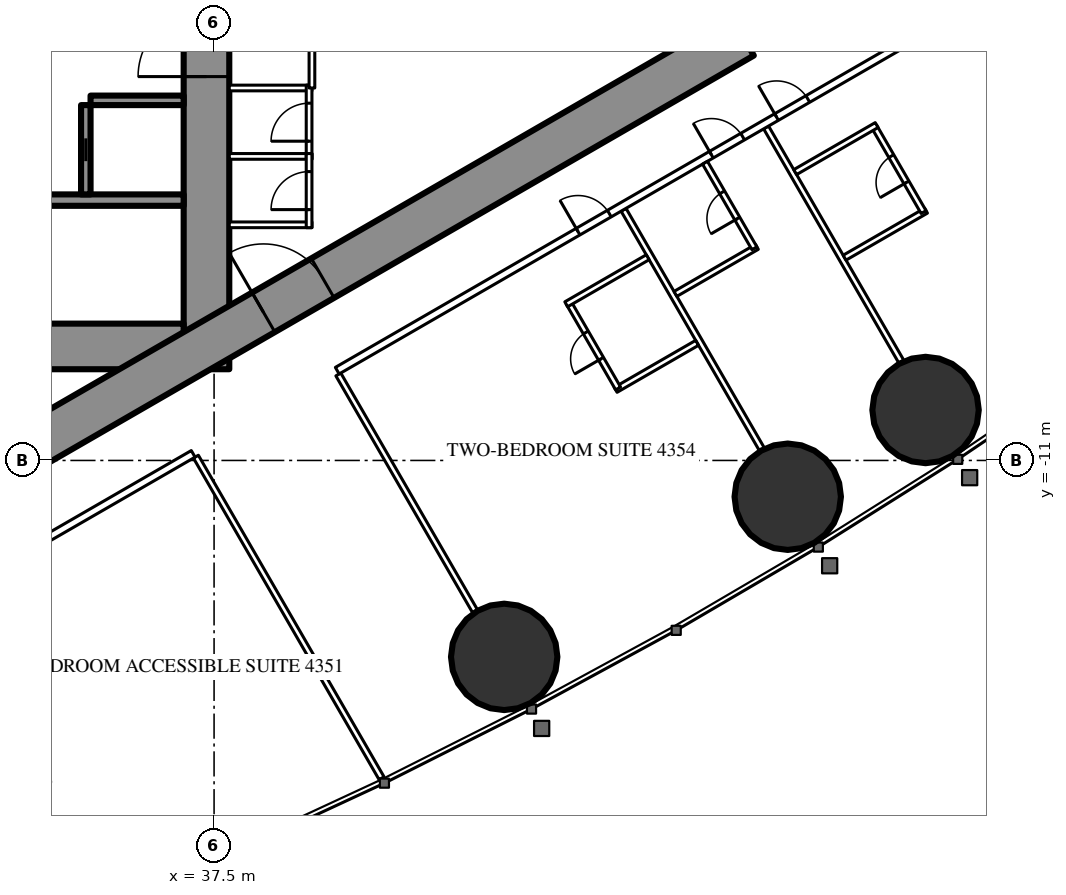
"""IFC4 building model, lengths in metres.
Left out: names, types, materials, properties, quantities, classifications, styles, units other than length and angle.
Written with IfcOpenShell. Run it as: python <this file> out.ifc"""

import sys

from ifc_helpers import new_model, si_unit, direction, frame, frame_2d, origin, origin_2d, place, context, subcontext, project, spatial, rectangle, circle, extrude, element, fill, save


model = new_model("IFC4")
c1 = context("Model", 3, precision=1e-05, world=origin(), true_north=direction((0.0, 1.0)))
c2 = subcontext(c1, "Body", "Model", "MODEL_VIEW")
j1 = project(units=[si_unit("LENGTHUNIT", "METRE"), si_unit("PLANEANGLEUNIT", "RADIAN")], contexts=[c1])
p1 = place(None, origin())
s1 = spatial("IfcSite", under=j1, at=p1, CompositionType="ELEMENT")
p2 = place(p1, origin())
s2 = spatial("IfcBuilding", under=s1, at=p2, CompositionType="ELEMENT")
p3 = place(p2, frame((0.0, 0.0, 163.3)))
s3 = spatial("IfcBuildingStorey", under=s2, at=p3, CompositionType="ELEMENT", Elevation=163.3)
for number, where, z_axis, x_axis in (
    (1, (45.134, -16.168, 0.0), (0.0, 0.0, 1.0), (1.0, 0.0, 0.0)),
    (2, (52.594, -11.955, 0.0), (0.0, 0.0, 1.0), (1.0, 0.0, 0.0)),
    (3, (56.221, -9.672, 0.0), (0.0, 0.0, 1.0), (1.0, 0.0, 0.0)),
):
    element("IfcColumn", number, at=place(p3, frame(where, z_axis=z_axis, x_axis=x_axis)), inside=s3, PredefinedType="COLUMN", context=c2, shape_type="SweptSolid", body=[
        extrude(circle(Radius=1.4, at=origin_2d()), origin(), (0.0, 0.0, 1.0), 3.5),
    ])
p4 = place(p3, frame((37.3, -8.6, 0.0), z_axis=(0.0, 0.0, 1.0), x_axis=(0.0, 1.0, 0.0)))
e4 = element("IfcWall", 4, at=p4, inside=s3, PredefinedType="SHEAR", context=c2, shape_type="SweptSolid", body=[
    extrude(rectangle(XDim=17.2, YDim=1.2, at=frame_2d((8.6, 0.0))), origin(), (0.0, 0.0, 1.0), 3.5),
])
p5 = place(p4, frame((7.7, 0.0, 0.0)))
e5 = element("IfcOpeningElement", 5, at=p5, cuts=e4, PredefinedType="OPENING", context=c2, shape_type="SweptSolid", body=[
    extrude(rectangle(XDim=1.8, YDim=2.2, at=frame_2d((0.9, 1.1))), frame((0.0, 0.61, 0.0), z_axis=(0.0, -1.0, 0.0), x_axis=(1.0, 0.0, 0.0)), (0.0, 0.0, 1.0), 1.22),
])
p6 = place(p3, frame((28.3, -8.0, 0.0), z_axis=(0.0, 0.0, 1.0), x_axis=(1.0, 0.0, 0.0)))
e6 = element("IfcWall", 6, at=p6, inside=s3, PredefinedType="SHEAR", context=c2, shape_type="SweptSolid", body=[
    extrude(rectangle(XDim=8.4, YDim=1.2, at=frame_2d((4.2, 0.0))), origin(), (0.0, 0.0, 1.0), 3.5),
])
p7 = place(p6, frame((0.25, 0.0, 0.0)))
e7 = element("IfcOpeningElement", 7, at=p7, cuts=e6, PredefinedType="OPENING", context=c2, shape_type="SweptSolid", body=[
    extrude(rectangle(XDim=1.0, YDim=2.2, at=frame_2d((0.5, 1.1))), frame((0.0, 0.61, 0.0), z_axis=(0.0, -1.0, 0.0), x_axis=(1.0, 0.0, 0.0)), (0.0, 0.0, 1.0), 1.22),
])
p8 = place(p3, frame((28.3, -4.15, 0.0), z_axis=(0.0, 0.0, 1.0), x_axis=(1.0, 0.0, 0.0)))
e8 = element("IfcWall", 8, at=p8, inside=s3, PredefinedType="SHEAR", context=c2, shape_type="SweptSolid", body=[
    extrude(rectangle(XDim=8.4, YDim=0.3, at=frame_2d((4.2, 0.0))), origin(), (0.0, 0.0, 1.0), 3.5),
])
p9 = place(p3, frame((34.125, -4.0, 0.0), z_axis=(0.0, 0.0, 1.0), x_axis=(0.0, 1.0, 0.0)))
e9 = element("IfcWall", 9, at=p9, inside=s3, PredefinedType="SHEAR", context=c2, shape_type="SweptSolid", body=[
    extrude(rectangle(XDim=2.35, YDim=0.25, at=frame_2d((1.175, 0.0))), origin(), (0.0, 0.0, 1.0), 3.5),
])
p10 = place(p9, frame((0.875, 0.0, 0.0)))
e10 = element("IfcOpeningElement", 10, at=p10, cuts=e9, PredefinedType="OPENING", context=c2, shape_type="SweptSolid", body=[
    extrude(rectangle(XDim=0.6, YDim=2.0, at=frame_2d((0.3, 1.0))), frame((0.0, 0.135, 0.0), z_axis=(0.0, -1.0, 0.0), x_axis=(1.0, 0.0, 0.0)), (0.0, 0.0, 1.0), 0.27),
])
p11 = place(p3, frame((34.25, -1.525, 0.0), z_axis=(0.0, 0.0, 1.0), x_axis=(1.0, 0.0, 0.0)))
e11 = element("IfcWall", 11, at=p11, inside=s3, PredefinedType="SHEAR", context=c2, shape_type="SweptSolid", body=[
    extrude(rectangle(XDim=2.45, YDim=0.25, at=frame_2d((1.225, 0.0))), origin(), (0.0, 0.0, 1.0), 3.5),
])
p12 = place(p3, frame((27.2, -13.8, 0.0), z_axis=(0.0, 0.0, 1.0), x_axis=(0.866027159892, 0.499996958321, 0.0)))
e12 = element("IfcWall", 12, at=p12, inside=s3, PredefinedType="SHEAR", context=c2, shape_type="SweptSolid", body=[
    extrude(rectangle(XDim=27.947, YDim=1.2, at=frame_2d((13.973, 0.0))), origin(), (0.0, 0.0, 1.0), 3.5),
])
p13 = place(p12, frame((4.6, 0.0, 0.0)))
e13 = element("IfcOpeningElement", 13, at=p13, cuts=e12, PredefinedType="OPENING", context=c2, shape_type="SweptSolid", body=[
    extrude(rectangle(XDim=1.0, YDim=2.2, at=frame_2d((0.5, 1.1))), frame((0.0, 0.61, 0.0), z_axis=(0.0, -1.0, 0.0), x_axis=(1.0, 0.0, 0.0)), (0.0, 0.0, 1.0), 1.22),
])
p14 = place(p12, frame((13.395, 0.0, 0.0)))
e14 = element("IfcOpeningElement", 14, at=p14, cuts=e12, PredefinedType="OPENING", context=c2, shape_type="SweptSolid", body=[
    extrude(rectangle(XDim=1.8, YDim=2.2, at=frame_2d((0.9, 1.1))), frame((0.0, 0.61, 0.0), z_axis=(0.0, -1.0, 0.0), x_axis=(1.0, 0.0, 0.0)), (0.0, 0.0, 1.0), 1.22),
])
p15 = place(p3, frame((37.022, -10.9, 0.0), z_axis=(0.0, 0.0, 1.0), x_axis=(0.499998620953, -0.866026199976, 0.0)))
e15 = element("IfcWall", 15, at=p15, inside=s3, PredefinedType="PARTITIONING", context=c2, shape_type="SweptSolid", body=[
    extrude(rectangle(XDim=9.77, YDim=0.15, at=frame_2d((4.885, 0.0))), origin(), (0.0, 0.0, 1.0), 3.25),
])
p16 = place(p3, frame((40.769, -8.737, 0.0), z_axis=(0.0, 0.0, 1.0), x_axis=(0.500013115284, -0.866017831539, 0.0)))
e16 = element("IfcWall", 16, at=p16, inside=s3, PredefinedType="PARTITIONING", context=c2, shape_type="SweptSolid", body=[
    extrude(rectangle(XDim=7.198, YDim=0.15, at=frame_2d((3.599, 0.0))), origin(), (0.0, 0.0, 1.0), 2.3),
])
p17 = place(p3, frame((48.275, -4.404, 0.0), z_axis=(0.0, 0.0, 1.0), x_axis=(0.500006004368, -0.866021937133, 0.0)))
e17 = element("IfcWall", 17, at=p17, inside=s3, PredefinedType="PARTITIONING", context=c2, shape_type="SweptSolid", body=[
    extrude(rectangle(XDim=7.279, YDim=0.15, at=frame_2d((3.64, 0.0))), origin(), (0.0, 0.0, 1.0), 2.3),
])
p18 = place(p3, frame((52.025, -2.238, 0.0), z_axis=(0.0, 0.0, 1.0), x_axis=(0.499983785035, -0.866034765296, 0.0)))
e18 = element("IfcWall", 18, at=p18, inside=s3, PredefinedType="PARTITIONING", context=c2, shape_type="SweptSolid", body=[
    extrude(rectangle(XDim=7.116, YDim=0.15, at=frame_2d((3.558, 0.0))), origin(), (0.0, 0.0, 1.0), 2.3),
])
p19 = place(p3, frame((27.959, -16.017, 0.0), z_axis=(0.0, 0.0, 1.0), x_axis=(0.866026201739, 0.499998617899, 0.0)))
e19 = element("IfcWall", 19, at=p19, inside=s3, PredefinedType="PARTITIONING", context=c2, shape_type="SweptSolid", body=[
    extrude(rectangle(XDim=10.382, YDim=0.2, at=frame_2d((5.191, 0.0))), origin(), (0.0, 0.0, 1.0), 3.25),
])
p20 = place(p19, frame((3.35, 0.0, 0.0)))
e20 = element("IfcOpeningElement", 20, at=p20, cuts=e19, PredefinedType="OPENING", context=c2, shape_type="SweptSolid", body=[
    extrude(rectangle(XDim=1.0, YDim=2.2, at=frame_2d((0.5, 1.1))), frame((0.0, 0.11, 0.0), z_axis=(0.0, -1.0, 0.0), x_axis=(1.0, 0.0, 0.0)), (0.0, 0.0, 1.0), 0.22),
])
p21 = place(p3, frame((40.741, -8.638, 0.0), z_axis=(0.0, 0.0, 1.0), x_axis=(0.866022967338, 0.500004220025, 0.0)))
e21 = element("IfcWall", 21, at=p21, inside=s3, PredefinedType="PARTITIONING", context=c2, shape_type="SweptSolid", body=[
    extrude(rectangle(XDim=17.276, YDim=0.2, at=frame_2d((8.638, 0.0))), origin(), (0.0, 0.0, 1.0), 3.25),
])
p22 = place(p21, frame((7.316, 0.0, 0.0)))
e22 = element("IfcOpeningElement", 22, at=p22, cuts=e21, PredefinedType="OPENING", context=c2, shape_type="SweptSolid", body=[
    extrude(rectangle(XDim=0.95, YDim=2.2, at=frame_2d((0.475, 1.1))), frame((0.0, 0.11, 0.0), z_axis=(0.0, -1.0, 0.0), x_axis=(1.0, 0.0, 0.0)), (0.0, 0.0, 1.0), 0.22),
])
p23 = place(p21, frame((11.366, 0.0, 0.0)))
e23 = element("IfcOpeningElement", 23, at=p23, cuts=e21, PredefinedType="OPENING", context=c2, shape_type="SweptSolid", body=[
    extrude(rectangle(XDim=0.95, YDim=2.2, at=frame_2d((0.475, 1.1))), frame((0.0, 0.11, 0.0), z_axis=(0.0, -1.0, 0.0), x_axis=(1.0, 0.0, 0.0)), (0.0, 0.0, 1.0), 0.22),
])
p24 = place(p21, frame((13.347, 0.0, 0.0)))
e24 = element("IfcOpeningElement", 24, at=p24, cuts=e21, PredefinedType="OPENING", context=c2, shape_type="SweptSolid", body=[
    extrude(rectangle(XDim=0.95, YDim=2.2, at=frame_2d((0.475, 1.1))), frame((0.0, 0.11, 0.0), z_axis=(0.0, -1.0, 0.0), x_axis=(1.0, 0.0, 0.0)), (0.0, 0.0, 1.0), 0.22),
])
p25 = place(p3, frame((48.066, -9.143, 0.0), z_axis=(0.0, 0.0, 1.0), x_axis=(0.866006523861, 0.500032699561, 0.0)))
e25 = element("IfcWall", 25, at=p25, inside=s3, PredefinedType="PARTITIONING", context=c2, shape_type="SweptSolid", body=[
    extrude(rectangle(XDim=2.475, YDim=0.15, at=frame_2d((1.237, 0.0))), origin(), (0.0, 0.0, 1.0), 3.25),
])
p26 = place(p3, frame((46.831, -6.854, 0.0), z_axis=(0.0, 0.0, 1.0), x_axis=(0.500006934395, -0.866021400173, 0.0)))
e26 = element("IfcWall", 26, at=p26, inside=s3, PredefinedType="PARTITIONING", context=c2, shape_type="SweptSolid", body=[
    extrude(rectangle(XDim=2.6, YDim=0.15, at=frame_2d((1.3, 0.0))), origin(), (0.0, 0.0, 1.0), 3.25),
])
p27 = place(p26, frame((0.9, 0.0, 0.0)))
e27 = element("IfcOpeningElement", 27, at=p27, cuts=e26, PredefinedType="OPENING", context=c2, shape_type="SweptSolid", body=[
    extrude(rectangle(XDim=0.8, YDim=2.2, at=frame_2d((0.4, 1.1))), frame((0.0, 0.085, 0.0), z_axis=(0.0, -1.0, 0.0), x_axis=(1.0, 0.0, 0.0)), (0.0, 0.0, 1.0), 0.17),
])
for number, where, z_axis, x_axis in (
    (28, (46.766, -6.891, 0.0), (0.0, 0.0, 1.0), (0.866, 0.5, 0.0)),
    (29, (49.64, -6.618, 0.0), (0.0, 0.0, 1.0), (0.866, 0.5, 0.0)),
):
    element("IfcWall", number, at=place(p3, frame(where, z_axis=z_axis, x_axis=x_axis)), inside=s3, PredefinedType="PARTITIONING", context=c2, shape_type="SweptSolid", body=[
        extrude(rectangle(XDim=2.475, YDim=0.15, at=frame_2d((1.237, 0.0))), origin(), (0.0, 0.0, 1.0), 3.25),
    ])
p28 = place(p3, frame((50.418, -3.166, 0.0), z_axis=(0.0, 0.0, 1.0), x_axis=(0.499936506574, -0.866062058628, 0.0)))
e30 = element("IfcWall", 30, at=p28, inside=s3, PredefinedType="PARTITIONING", context=c2, shape_type="SweptSolid", body=[
    extrude(rectangle(XDim=2.6, YDim=0.15, at=frame_2d((1.3, 0.0))), origin(), (0.0, 0.0, 1.0), 3.25),
])
p29 = place(p28, frame((0.9, 0.0, 0.0)))
e31 = element("IfcOpeningElement", 31, at=p29, cuts=e30, PredefinedType="OPENING", context=c2, shape_type="SweptSolid", body=[
    extrude(rectangle(XDim=0.8, YDim=2.2, at=frame_2d((0.4, 1.1))), frame((0.0, 0.085, 0.0), z_axis=(0.0, -1.0, 0.0), x_axis=(1.0, 0.0, 0.0)), (0.0, 0.0, 1.0), 0.17),
])
p30 = place(p3, frame((54.09, -5.665, 0.0), z_axis=(0.0, 0.0, 1.0), x_axis=(0.866006523861, 0.500032699561, 0.0)))
e32 = element("IfcWall", 32, at=p30, inside=s3, PredefinedType="PARTITIONING", context=c2, shape_type="SweptSolid", body=[
    extrude(rectangle(XDim=2.475, YDim=0.15, at=frame_2d((1.237, 0.0))), origin(), (0.0, 0.0, 1.0), 3.25),
])
p31 = place(p3, frame((54.869, -2.213, 0.0), z_axis=(0.0, 0.0, 1.0), x_axis=(0.500047596559, -0.865997922154, 0.0)))
e33 = element("IfcWall", 33, at=p31, inside=s3, PredefinedType="PARTITIONING", context=c2, shape_type="SweptSolid", body=[
    extrude(rectangle(XDim=2.6, YDim=0.15, at=frame_2d((1.3, 0.0))), origin(), (0.0, 0.0, 1.0), 3.25),
])
p32 = place(p31, frame((0.9, 0.0, 0.0)))
e34 = element("IfcOpeningElement", 34, at=p32, cuts=e33, PredefinedType="OPENING", context=c2, shape_type="SweptSolid", body=[
    extrude(rectangle(XDim=0.8, YDim=2.2, at=frame_2d((0.4, 1.1))), frame((0.0, 0.085, 0.0), z_axis=(0.0, -1.0, 0.0), x_axis=(1.0, 0.0, 0.0)), (0.0, 0.0, 1.0), 0.17),
])
p33 = place(p3, frame((52.79, -3.413, 0.0), z_axis=(0.0, 0.0, 1.0), x_axis=(0.866006523861, 0.500032699561, 0.0)))
e35 = element("IfcWall", 35, at=p33, inside=s3, PredefinedType="PARTITIONING", context=c2, shape_type="SweptSolid", body=[
    extrude(rectangle(XDim=2.475, YDim=0.15, at=frame_2d((1.237, 0.0))), origin(), (0.0, 0.0, 1.0), 3.25),
])
for number, where, z_axis, x_axis in (
    (36, (37.9, -1.2, 0.0), (0.0, 0.0, 1.0), (1.0, 0.0, 0.0)),
    (37, (37.9, -3.0, 0.0), (0.0, 0.0, 1.0), (1.0, 0.0, 0.0)),
    (38, (37.9, -4.8, 0.0), (0.0, 0.0, 1.0), (1.0, 0.0, 0.0)),
):
    element("IfcWall", number, at=place(p3, frame(where, z_axis=z_axis, x_axis=x_axis)), inside=s3, PredefinedType="PARTITIONING", context=c2, shape_type="SweptSolid", body=[
        extrude(rectangle(XDim=2.175, YDim=0.15, at=frame_2d((1.087, 0.0))), origin(), (0.0, 0.0, 1.0), 3.25),
    ])
p34 = place(p3, frame((40.0, -3.075, 0.0), z_axis=(0.0, 0.0, 1.0), x_axis=(0.0, 1.0, 0.0)))
e39 = element("IfcWall", 39, at=p34, inside=s3, PredefinedType="PARTITIONING", context=c2, shape_type="SweptSolid", body=[
    extrude(rectangle(XDim=1.95, YDim=0.15, at=frame_2d((0.975, 0.0))), origin(), (0.0, 0.0, 1.0), 3.25),
])
p35 = place(p34, frame((0.475, 0.0, 0.0)))
e40 = element("IfcOpeningElement", 40, at=p35, cuts=e39, PredefinedType="OPENING", context=c2, shape_type="SweptSolid", body=[
    extrude(rectangle(XDim=1.0, YDim=2.2, at=frame_2d((0.5, 1.1))), frame((0.0, 0.085, 0.0), z_axis=(0.0, -1.0, 0.0), x_axis=(1.0, 0.0, 0.0)), (0.0, 0.0, 1.0), 0.17),
])
p36 = place(p3, frame((40.0, -4.875, 0.0), z_axis=(0.0, 0.0, 1.0), x_axis=(0.0, 1.0, 0.0)))
e41 = element("IfcWall", 41, at=p36, inside=s3, PredefinedType="PARTITIONING", context=c2, shape_type="SweptSolid", body=[
    extrude(rectangle(XDim=1.95, YDim=0.15, at=frame_2d((0.975, 0.0))), origin(), (0.0, 0.0, 1.0), 3.25),
])
p37 = place(p36, frame((0.475, 0.0, 0.0)))
e42 = element("IfcOpeningElement", 42, at=p37, cuts=e41, PredefinedType="OPENING", context=c2, shape_type="SweptSolid", body=[
    extrude(rectangle(XDim=1.0, YDim=2.2, at=frame_2d((0.5, 1.1))), frame((0.0, 0.085, 0.0), z_axis=(0.0, -1.0, 0.0), x_axis=(1.0, 0.0, 0.0)), (0.0, 0.0, 1.0), 0.17),
])
p38 = place(p3, frame((40.075, -1.2, 0.0), z_axis=(0.0, 0.0, 1.0), x_axis=(0.0, 1.0, 0.0)))
e43 = element("IfcWall", 43, at=p38, inside=s3, PredefinedType="PARTITIONING", context=c2, shape_type="SweptSolid", body=[
    extrude(rectangle(XDim=6.874, YDim=0.15, at=frame_2d((3.437, 0.0))), origin(), (0.0, 0.0, 1.0), 3.25),
])
p39 = place(p38, frame((2.537, 0.0, 0.0)))
e44 = element("IfcOpeningElement", 44, at=p39, cuts=e43, PredefinedType="OPENING", context=c2, shape_type="SweptSolid", body=[
    extrude(rectangle(XDim=1.8, YDim=2.2, at=frame_2d((0.9, 1.1))), frame((0.0, 0.085, 0.0), z_axis=(0.0, -1.0, 0.0), x_axis=(1.0, 0.0, 0.0)), (0.0, 0.0, 1.0), 0.17),
])
p40 = place(p27, origin())
e45 = element("IfcDoor", 45, at=p40, inside=s3, OperationType="SINGLE_SWING_RIGHT", PredefinedType="DOOR", context=c2, shape_type="SweptSolid", body=[
    extrude(rectangle(XDim=0.8, YDim=2.2, at=frame_2d((0.4, 1.1))), frame((0.0, 0.025, 0.0), z_axis=(0.0, -1.0, 0.0), x_axis=(1.0, 0.0, 0.0)), (0.0, 0.0, 1.0), 0.05),
])
fill(e27, e45)
p41 = place(p22, origin())
e46 = element("IfcDoor", 46, at=p41, inside=s3, OperationType="SINGLE_SWING_LEFT", PredefinedType="DOOR", context=c2, shape_type="SweptSolid", body=[
    extrude(rectangle(XDim=0.95, YDim=2.2, at=frame_2d((0.475, 1.1))), frame((0.0, 0.025, 0.0), z_axis=(0.0, -1.0, 0.0), x_axis=(1.0, 0.0, 0.0)), (0.0, 0.0, 1.0), 0.05),
])
fill(e22, e46)
p42 = place(p29, origin())
e47 = element("IfcDoor", 47, at=p42, inside=s3, OperationType="SINGLE_SWING_RIGHT", PredefinedType="DOOR", context=c2, shape_type="SweptSolid", body=[
    extrude(rectangle(XDim=0.8, YDim=2.2, at=frame_2d((0.4, 1.1))), frame((0.0, 0.025, 0.0), z_axis=(0.0, -1.0, 0.0), x_axis=(1.0, 0.0, 0.0)), (0.0, 0.0, 1.0), 0.05),
])
fill(e31, e47)
p43 = place(p23, origin())
e48 = element("IfcDoor", 48, at=p43, inside=s3, OperationType="SINGLE_SWING_LEFT", PredefinedType="DOOR", context=c2, shape_type="SweptSolid", body=[
    extrude(rectangle(XDim=0.95, YDim=2.2, at=frame_2d((0.475, 1.1))), frame((0.0, 0.025, 0.0), z_axis=(0.0, -1.0, 0.0), x_axis=(1.0, 0.0, 0.0)), (0.0, 0.0, 1.0), 0.05),
])
fill(e23, e48)
p44 = place(p32, origin())
e49 = element("IfcDoor", 49, at=p44, inside=s3, OperationType="SINGLE_SWING_RIGHT", PredefinedType="DOOR", context=c2, shape_type="SweptSolid", body=[
    extrude(rectangle(XDim=0.8, YDim=2.2, at=frame_2d((0.4, 1.1))), frame((0.0, 0.025, 0.0), z_axis=(0.0, -1.0, 0.0), x_axis=(1.0, 0.0, 0.0)), (0.0, 0.0, 1.0), 0.05),
])
fill(e34, e49)
p45 = place(p24, origin())
e50 = element("IfcDoor", 50, at=p45, inside=s3, OperationType="SINGLE_SWING_LEFT", PredefinedType="DOOR", context=c2, shape_type="SweptSolid", body=[
    extrude(rectangle(XDim=0.95, YDim=2.2, at=frame_2d((0.475, 1.1))), frame((0.0, 0.025, 0.0), z_axis=(0.0, -1.0, 0.0), x_axis=(1.0, 0.0, 0.0)), (0.0, 0.0, 1.0), 0.05),
])
fill(e24, e50)
p46 = place(p35, origin())
e51 = element("IfcDoor", 51, at=p46, inside=s3, OperationType="SINGLE_SWING_LEFT", PredefinedType="DOOR", context=c2, shape_type="SweptSolid", body=[
    extrude(rectangle(XDim=1.0, YDim=2.2, at=frame_2d((0.5, 1.1))), frame((0.0, 0.025, 0.0), z_axis=(0.0, -1.0, 0.0), x_axis=(1.0, 0.0, 0.0)), (0.0, 0.0, 1.0), 0.05),
])
fill(e40, e51)
p47 = place(p37, origin())
e52 = element("IfcDoor", 52, at=p47, inside=s3, OperationType="SINGLE_SWING_LEFT", PredefinedType="DOOR", context=c2, shape_type="SweptSolid", body=[
    extrude(rectangle(XDim=1.0, YDim=2.2, at=frame_2d((0.5, 1.1))), frame((0.0, 0.025, 0.0), z_axis=(0.0, -1.0, 0.0), x_axis=(1.0, 0.0, 0.0)), (0.0, 0.0, 1.0), 0.05),
])
fill(e42, e52)
p48 = place(p14, origin())
e53 = element("IfcDoor", 53, at=p48, inside=s3, OperationType="DOUBLE_DOOR_SINGLE_SWING", PredefinedType="DOOR", context=c2, shape_type="SweptSolid", body=[
    extrude(rectangle(XDim=1.8, YDim=2.2, at=frame_2d((0.9, 1.1))), frame((0.0, 0.025, 0.0), z_axis=(0.0, -1.0, 0.0), x_axis=(1.0, 0.0, 0.0)), (0.0, 0.0, 1.0), 0.05),
])
fill(e14, e53)
p49 = place(p5, origin())
e54 = element("IfcDoor", 54, at=p49, inside=s3, OperationType="DOUBLE_DOOR_SINGLE_SWING", PredefinedType="DOOR", context=c2, shape_type="SweptSolid", body=[
    extrude(rectangle(XDim=1.8, YDim=2.2, at=frame_2d((0.9, 1.1))), frame((0.0, 0.025, 0.0), z_axis=(0.0, -1.0, 0.0), x_axis=(1.0, 0.0, 0.0)), (0.0, 0.0, 1.0), 0.05),
])
fill(e5, e54)
p50 = place(p10, origin())
e55 = element("IfcDoor", 55, at=p50, inside=s3, OperationType="SLIDING_TO_LEFT", PredefinedType="DOOR", context=c2, shape_type="SweptSolid", body=[
    extrude(rectangle(XDim=0.6, YDim=2.0, at=frame_2d((0.3, 1.0))), frame((0.0, 0.025, 0.0), z_axis=(0.0, -1.0, 0.0), x_axis=(1.0, 0.0, 0.0)), (0.0, 0.0, 1.0), 0.05),
])
fill(e10, e55)
save(model, sys.argv[1])
